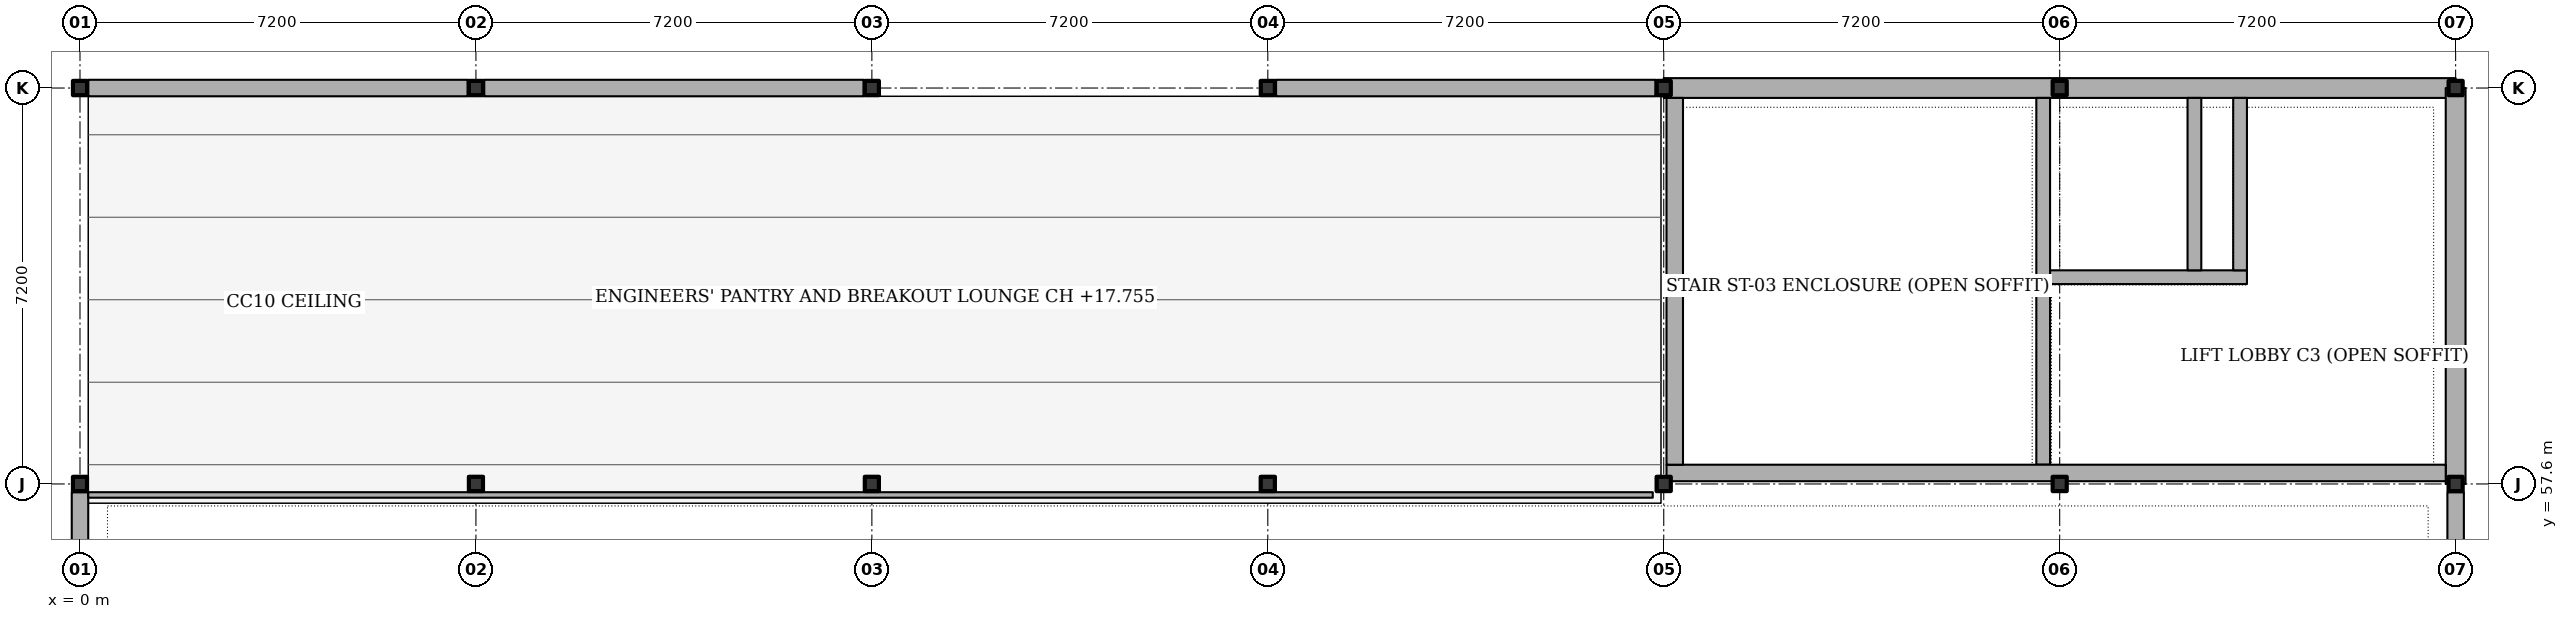
"""IFC4 building model, lengths in metres.
Left out: names, types, materials, properties, quantities, classifications, styles, units other than length and angle.
Written with IfcOpenShell. Run it as: python <this file> out.ifc"""

import sys

from ifc_helpers import new_model, si_unit, direction, frame, frame_2d, origin, origin_2d, place, context, subcontext, project, spatial, rectangle, i_section, extrude, element, fill, save


model = new_model("IFC4")
c1 = context("Model", 3, precision=1e-05, world=origin(), true_north=direction((0.0, 1.0)))
c2 = subcontext(c1, "Body", "Model", "MODEL_VIEW")
j1 = project(units=[si_unit("LENGTHUNIT", "METRE"), si_unit("PLANEANGLEUNIT", "RADIAN")], contexts=[c1])
p1 = place(None, origin())
s1 = spatial("IfcSite", under=j1, at=p1, CompositionType="ELEMENT")
p2 = place(p1, origin())
s2 = spatial("IfcBuilding", under=s1, at=p2, CompositionType="ELEMENT")
p3 = place(p2, frame((0.0, 0.0, 14.4)))
s3 = spatial("IfcBuildingStorey", under=s2, at=p3, CompositionType="ELEMENT", Elevation=14.4)
for number, where, z_axis, x_axis in (
    (1, (0.0, 57.6, 0.0), (0.0, 0.0, 1.0), (1.0, 0.0, 0.0)),
    (2, (0.0, 64.8, 0.0), (0.0, 0.0, 1.0), (1.0, 0.0, 0.0)),
    (3, (7.2, 57.6, 0.0), (0.0, 0.0, 1.0), (1.0, 0.0, 0.0)),
    (4, (7.2, 64.8, 0.0), (0.0, 0.0, 1.0), (1.0, 0.0, 0.0)),
    (5, (14.4, 57.6, 0.0), (0.0, 0.0, 1.0), (1.0, 0.0, 0.0)),
    (6, (14.4, 64.8, 0.0), (0.0, 0.0, 1.0), (1.0, 0.0, 0.0)),
    (7, (21.6, 57.6, 0.0), (0.0, 0.0, 1.0), (1.0, 0.0, 0.0)),
    (8, (21.6, 64.8, 0.0), (0.0, 0.0, 1.0), (1.0, 0.0, 0.0)),
    (9, (28.8, 57.6, 0.0), (0.0, 0.0, 1.0), (1.0, 0.0, 0.0)),
    (10, (28.8, 64.8, 0.0), (0.0, 0.0, 1.0), (1.0, 0.0, 0.0)),
    (11, (36.0, 57.6, 0.0), (0.0, 0.0, 1.0), (1.0, 0.0, 0.0)),
    (12, (36.0, 64.8, 0.0), (0.0, 0.0, 1.0), (1.0, 0.0, 0.0)),
    (13, (43.2, 57.6, 0.0), (0.0, 0.0, 1.0), (1.0, 0.0, 0.0)),
    (14, (43.2, 64.8, 0.0), (0.0, 0.0, 1.0), (1.0, 0.0, 0.0)),
):
    element("IfcColumn", number, at=place(p3, frame(where, z_axis=z_axis, x_axis=x_axis)), inside=s3, PredefinedType="COLUMN", context=c2, shape_type="SweptSolid", body=[
        extrude(i_section(OverallWidth=0.256, OverallDepth=0.26, WebThickness=0.01, FlangeThickness=0.017, FilletRadius=0.013, at=origin_2d()), origin(), (0.0, 0.0, 1.0), 4.5),
    ])
p4 = place(p3, frame((0.0, 50.55, 0.0), z_axis=(0.0, 0.0, 1.0), x_axis=(0.0, 1.0, 0.0)))
e15 = element("IfcWall", 15, at=p4, inside=s3, PredefinedType="SOLIDWALL", context=c2, shape_type="SweptSolid", body=[
    extrude(rectangle(XDim=6.9, YDim=0.3, at=frame_2d((3.45, 0.0))), origin(), (0.0, 0.0, 1.0), 3.85),
])
p5 = place(p4, frame((1.6, 0.0, 1.05)))
e16 = element("IfcOpeningElement", 16, at=p5, cuts=e15, PredefinedType="OPENING", context=c2, shape_type="SweptSolid", body=[
    extrude(rectangle(XDim=0.8, YDim=1.4, at=frame_2d((0.4, 0.7))), frame((0.0, 0.16, 0.0), z_axis=(0.0, -1.0, 0.0), x_axis=(1.0, 0.0, 0.0)), (0.0, 0.0, 1.0), 0.32),
])
p6 = place(p3, frame((0.15, 64.8, 0.0), z_axis=(0.0, 0.0, 1.0), x_axis=(1.0, 0.0, 0.0)))
e17 = element("IfcWall", 17, at=p6, inside=s3, PredefinedType="SOLIDWALL", context=c2, shape_type="SweptSolid", body=[
    extrude(rectangle(XDim=6.9, YDim=0.3, at=frame_2d((3.45, 0.0))), origin(), (0.0, 0.0, 1.0), 3.85),
])
p7 = place(p3, frame((7.35, 64.8, 0.0), z_axis=(0.0, 0.0, 1.0), x_axis=(1.0, 0.0, 0.0)))
e18 = element("IfcWall", 18, at=p7, inside=s3, PredefinedType="SOLIDWALL", context=c2, shape_type="SweptSolid", body=[
    extrude(rectangle(XDim=6.9, YDim=0.3, at=frame_2d((3.45, 0.0))), origin(), (0.0, 0.0, 1.0), 3.85),
])
p8 = place(p7, frame((2.62, 0.0, 1.05)))
e19 = element("IfcOpeningElement", 19, at=p8, cuts=e18, PredefinedType="OPENING", context=c2, shape_type="SweptSolid", body=[
    extrude(rectangle(XDim=1.66, YDim=1.8, at=frame_2d((0.83, 0.9))), frame((0.0, 0.16, 0.0), z_axis=(0.0, -1.0, 0.0), x_axis=(1.0, 0.0, 0.0)), (0.0, 0.0, 1.0), 0.32),
])
p9 = place(p3, frame((21.75, 64.8, 0.0), z_axis=(0.0, 0.0, 1.0), x_axis=(1.0, 0.0, 0.0)))
e20 = element("IfcWall", 20, at=p9, inside=s3, PredefinedType="SOLIDWALL", context=c2, shape_type="SweptSolid", body=[
    extrude(rectangle(XDim=6.9, YDim=0.3, at=frame_2d((3.45, 0.0))), origin(), (0.0, 0.0, 1.0), 3.414),
])
p10 = place(p9, frame((2.17, 0.0, 1.05)))
e21 = element("IfcOpeningElement", 21, at=p10, cuts=e20, PredefinedType="OPENING", context=c2, shape_type="SweptSolid", body=[
    extrude(rectangle(XDim=2.56, YDim=1.55, at=frame_2d((1.28, 0.775))), frame((0.0, 0.16, 0.0), z_axis=(0.0, -1.0, 0.0), x_axis=(1.0, 0.0, 0.0)), (0.0, 0.0, 1.0), 0.32),
])
p11 = place(p3, frame((28.8, 64.8, 0.0), z_axis=(0.0, 0.0, 1.0), x_axis=(1.0, 0.0, 0.0)))
e22 = element("IfcWall", 22, at=p11, inside=s3, PredefinedType="SHEAR", context=c2, shape_type="SweptSolid", body=[
    extrude(rectangle(XDim=7.2, YDim=0.36, at=frame_2d((3.6, 0.0))), origin(), (0.0, 0.0, 1.0), 3.414),
])
p12 = place(p3, frame((36.0, 64.8, 0.0), z_axis=(0.0, 0.0, 1.0), x_axis=(1.0, 0.0, 0.0)))
e23 = element("IfcWall", 23, at=p12, inside=s3, PredefinedType="SHEAR", context=c2, shape_type="SweptSolid", body=[
    extrude(rectangle(XDim=7.2, YDim=0.36, at=frame_2d((3.6, 0.0))), origin(), (0.0, 0.0, 1.0), 3.503),
])
p13 = place(p3, frame((43.2, 64.8, 0.0), z_axis=(0.0, 0.0, 1.0), x_axis=(0.0, -1.0, 0.0)))
e24 = element("IfcWall", 24, at=p13, inside=s3, PredefinedType="SHEAR", context=c2, shape_type="SweptSolid", body=[
    extrude(rectangle(XDim=7.2, YDim=0.36, at=frame_2d((3.6, 0.0))), origin(), (0.0, 0.0, 1.0), 3.503),
])
p14 = place(p13, frame((3.0, 0.0, 0.0)))
e25 = element("IfcOpeningElement", 25, at=p14, cuts=e24, PredefinedType="OPENING", context=c2, shape_type="SweptSolid", body=[
    extrude(rectangle(XDim=1.2, YDim=2.15, at=frame_2d((0.6, 1.075))), frame((0.0, 0.19, 0.0), z_axis=(0.0, -1.0, 0.0), x_axis=(1.0, 0.0, 0.0)), (0.0, 0.0, 1.0), 0.38),
])
p15 = place(p3, frame((43.2, 57.45, 0.0), z_axis=(0.0, 0.0, 1.0), x_axis=(0.0, -1.0, 0.0)))
e26 = element("IfcWall", 26, at=p15, inside=s3, PredefinedType="SOLIDWALL", context=c2, shape_type="SweptSolid", body=[
    extrude(rectangle(XDim=6.9, YDim=0.3, at=frame_2d((3.45, 0.0))), origin(), (0.0, 0.0, 1.0), 3.503),
])
p16 = place(p15, frame((4.07, 0.0, 1.05)))
e27 = element("IfcOpeningElement", 27, at=p16, cuts=e26, PredefinedType="OPENING", context=c2, shape_type="SweptSolid", body=[
    extrude(rectangle(XDim=1.66, YDim=1.8, at=frame_2d((0.83, 0.9))), frame((0.0, 0.16, 0.0), z_axis=(0.0, -1.0, 0.0), x_axis=(1.0, 0.0, 0.0)), (0.0, 0.0, 1.0), 0.32),
])
p17 = place(p3, frame((35.7, 57.95, 0.0), z_axis=(0.0, 0.0, 1.0), x_axis=(0.0, 1.0, 0.0)))
e28 = element("IfcWall", 28, at=p17, inside=s3, PredefinedType="SHEAR", context=c2, shape_type="SweptSolid", body=[
    extrude(rectangle(XDim=6.67, YDim=0.25, at=frame_2d((3.335, 0.0))), origin(), (0.0, 0.0, 1.0), 3.6),
])
p18 = place(p17, frame((0.95, 0.0, 0.0)))
e29 = element("IfcOpeningElement", 29, at=p18, cuts=e28, PredefinedType="OPENING", context=c2, shape_type="SweptSolid", body=[
    extrude(rectangle(XDim=1.35, YDim=2.15, at=frame_2d((0.675, 1.075))), frame((0.0, 0.135, 0.0), z_axis=(0.0, -1.0, 0.0), x_axis=(1.0, 0.0, 0.0)), (0.0, 0.0, 1.0), 0.27),
])
p19 = place(p3, frame((35.825, 61.36, 0.0), z_axis=(0.0, 0.0, 1.0), x_axis=(1.0, 0.0, 0.0)))
e30 = element("IfcWall", 30, at=p19, inside=s3, PredefinedType="SHEAR", context=c2, shape_type="SweptSolid", body=[
    extrude(rectangle(XDim=3.58, YDim=0.25, at=frame_2d((1.79, 0.0))), origin(), (0.0, 0.0, 1.0), 3.6),
])
p20 = place(p19, frame((0.775, 0.0, 0.0)))
e31 = element("IfcOpeningElement", 31, at=p20, cuts=e30, PredefinedType="OPENING", context=c2, shape_type="SweptSolid", body=[
    extrude(rectangle(XDim=1.1, YDim=2.15, at=frame_2d((0.55, 1.075))), frame((0.0, 0.135, 0.0), z_axis=(0.0, -1.0, 0.0), x_axis=(1.0, 0.0, 0.0)), (0.0, 0.0, 1.0), 0.27),
])
p21 = place(p3, frame((38.45, 61.485, 0.0), z_axis=(0.0, 0.0, 1.0), x_axis=(0.0, 1.0, 0.0)))
e32 = element("IfcWall", 32, at=p21, inside=s3, PredefinedType="SHEAR", context=c2, shape_type="SweptSolid", body=[
    extrude(rectangle(XDim=3.135, YDim=0.25, at=frame_2d((1.567, 0.0))), origin(), (0.0, 0.0, 1.0), 3.6),
])
p22 = place(p3, frame((39.28, 61.485, 0.0), z_axis=(0.0, 0.0, 1.0), x_axis=(0.0, 1.0, 0.0)))
e33 = element("IfcWall", 33, at=p22, inside=s3, PredefinedType="SHEAR", context=c2, shape_type="SweptSolid", body=[
    extrude(rectangle(XDim=3.135, YDim=0.25, at=frame_2d((1.567, 0.0))), origin(), (0.0, 0.0, 1.0), 3.6),
])
p23 = place(p22, frame((0.9, 0.0, 0.0)))
e34 = element("IfcOpeningElement", 34, at=p23, cuts=e33, PredefinedType="OPENING", context=c2, shape_type="SweptSolid", body=[
    extrude(rectangle(XDim=0.92, YDim=2.05, at=frame_2d((0.46, 1.025))), frame((0.0, 0.135, 0.0), z_axis=(0.0, -1.0, 0.0), x_axis=(1.0, 0.0, 0.0)), (0.0, 0.0, 1.0), 0.27),
])
p24 = place(p3, frame((28.85, 57.8, 0.0), z_axis=(0.0, 0.0, 1.0), x_axis=(1.0, 0.0, 0.0)))
e35 = element("IfcWall", 35, at=p24, inside=s3, PredefinedType="SHEAR", context=c2, shape_type="SweptSolid", body=[
    extrude(rectangle(XDim=14.17, YDim=0.3, at=frame_2d((7.085, 0.0))), origin(), (0.0, 0.0, 1.0), 3.6),
])
p25 = place(p24, frame((11.5, 0.0, 0.0)))
e36 = element("IfcOpeningElement", 36, at=p25, cuts=e35, PredefinedType="OPENING", context=c2, shape_type="SweptSolid", body=[
    extrude(rectangle(XDim=1.5, YDim=2.15, at=frame_2d((0.75, 1.075))), frame((0.0, 0.16, 0.0), z_axis=(0.0, -1.0, 0.0), x_axis=(1.0, 0.0, 0.0)), (0.0, 0.0, 1.0), 0.32),
])
p26 = place(p3, frame((29.0, 57.95, 0.0), z_axis=(0.0, 0.0, 1.0), x_axis=(0.0, 1.0, 0.0)))
e37 = element("IfcWall", 37, at=p26, inside=s3, PredefinedType="SHEAR", context=c2, shape_type="SweptSolid", body=[
    extrude(rectangle(XDim=6.67, YDim=0.3, at=frame_2d((3.335, 0.0))), origin(), (0.0, 0.0, 1.0), 3.6),
])
p27 = place(p3, frame((0.15, 57.4, 0.0), z_axis=(0.0, 0.0, 1.0), x_axis=(1.0, 0.0, 0.0)))
e38 = element("IfcWall", 38, at=p27, inside=s3, PredefinedType="PARTITIONING", context=c2, shape_type="SweptSolid", body=[
    extrude(rectangle(XDim=28.45, YDim=0.1, at=frame_2d((14.225, 0.0))), origin(), (0.0, 0.0, 1.0), 3.55),
])
p28 = place(p27, frame((16.757, 0.0, 0.0)))
e39 = element("IfcOpeningElement", 39, at=p28, cuts=e38, PredefinedType="OPENING", context=c2, shape_type="SweptSolid", body=[
    extrude(rectangle(XDim=1.6, YDim=2.2, at=frame_2d((0.8, 1.1))), frame((0.0, 0.06, 0.0), z_axis=(0.0, -1.0, 0.0), x_axis=(1.0, 0.0, 0.0)), (0.0, 0.0, 1.0), 0.12),
])
p29 = place(p8, origin())
e40 = element("IfcWindow", 40, at=p29, inside=s3, PartitioningType="SINGLE_PANEL", PredefinedType="WINDOW", context=c2, shape_type="SweptSolid", body=[
    extrude(rectangle(XDim=1.66, YDim=1.8, at=frame_2d((0.83, 0.9))), frame((0.0, 0.03, 0.0), z_axis=(0.0, -1.0, 0.0), x_axis=(1.0, 0.0, 0.0)), (0.0, 0.0, 1.0), 0.06),
])
fill(e19, e40)
p30 = place(p10, origin())
e41 = element("IfcWindow", 41, at=p30, inside=s3, PartitioningType="SINGLE_PANEL", PredefinedType="WINDOW", context=c2, shape_type="SweptSolid", body=[
    extrude(rectangle(XDim=2.56, YDim=1.55, at=frame_2d((1.28, 0.775))), frame((0.0, 0.03, 0.0), z_axis=(0.0, -1.0, 0.0), x_axis=(1.0, 0.0, 0.0)), (0.0, 0.0, 1.0), 0.06),
])
fill(e21, e41)
p31 = place(p14, origin())
e42 = element("IfcDoor", 42, at=p31, inside=s3, OperationType="SINGLE_SWING_LEFT", PredefinedType="DOOR", context=c2, shape_type="SweptSolid", body=[
    extrude(rectangle(XDim=1.2, YDim=2.15, at=frame_2d((0.6, 1.075))), frame((0.0, 0.025, 0.0), z_axis=(0.0, -1.0, 0.0), x_axis=(1.0, 0.0, 0.0)), (0.0, 0.0, 1.0), 0.05),
])
fill(e25, e42)
p32 = place(p18, origin())
e43 = element("IfcDoor", 43, at=p32, inside=s3, OperationType="SINGLE_SWING_LEFT", PredefinedType="DOOR", context=c2, shape_type="SweptSolid", body=[
    extrude(rectangle(XDim=1.35, YDim=2.15, at=frame_2d((0.675, 1.075))), frame((0.0, 0.025, 0.0), z_axis=(0.0, -1.0, 0.0), x_axis=(1.0, 0.0, 0.0)), (0.0, 0.0, 1.0), 0.05),
])
fill(e29, e43)
p33 = place(p20, origin())
e44 = element("IfcDoor", 44, at=p33, inside=s3, OperationType="SLIDING_TO_LEFT", PredefinedType="DOOR", context=c2, shape_type="SweptSolid", body=[
    extrude(rectangle(XDim=1.1, YDim=2.15, at=frame_2d((0.55, 1.075))), frame((0.0, 0.025, 0.0), z_axis=(0.0, -1.0, 0.0), x_axis=(1.0, 0.0, 0.0)), (0.0, 0.0, 1.0), 0.05),
])
fill(e31, e44)
p34 = place(p23, origin())
e45 = element("IfcDoor", 45, at=p34, inside=s3, OperationType="SINGLE_SWING_RIGHT", PredefinedType="DOOR", context=c2, shape_type="SweptSolid", body=[
    extrude(rectangle(XDim=0.92, YDim=2.05, at=frame_2d((0.46, 1.025))), frame((0.0, 0.025, 0.0), z_axis=(0.0, -1.0, 0.0), x_axis=(1.0, 0.0, 0.0)), (0.0, 0.0, 1.0), 0.05),
])
fill(e34, e45)
p35 = place(p25, origin())
e46 = element("IfcDoor", 46, at=p35, inside=s3, OperationType="SINGLE_SWING_LEFT", PredefinedType="DOOR", context=c2, shape_type="SweptSolid", body=[
    extrude(rectangle(XDim=1.5, YDim=2.15, at=frame_2d((0.75, 1.075))), frame((0.0, 0.025, 0.0), z_axis=(0.0, -1.0, 0.0), x_axis=(1.0, 0.0, 0.0)), (0.0, 0.0, 1.0), 0.05),
])
fill(e36, e46)
p36 = place(p28, origin())
e47 = element("IfcDoor", 47, at=p36, inside=s3, OperationType="DOUBLE_SWING_LEFT", PredefinedType="DOOR", context=c2, shape_type="SweptSolid", body=[
    extrude(rectangle(XDim=1.6, YDim=2.2, at=frame_2d((0.8, 1.1))), frame((0.0, 0.025, 0.0), z_axis=(0.0, -1.0, 0.0), x_axis=(1.0, 0.0, 0.0)), (0.0, 0.0, 1.0), 0.05),
])
fill(e39, e47)
save(model, sys.argv[1])
